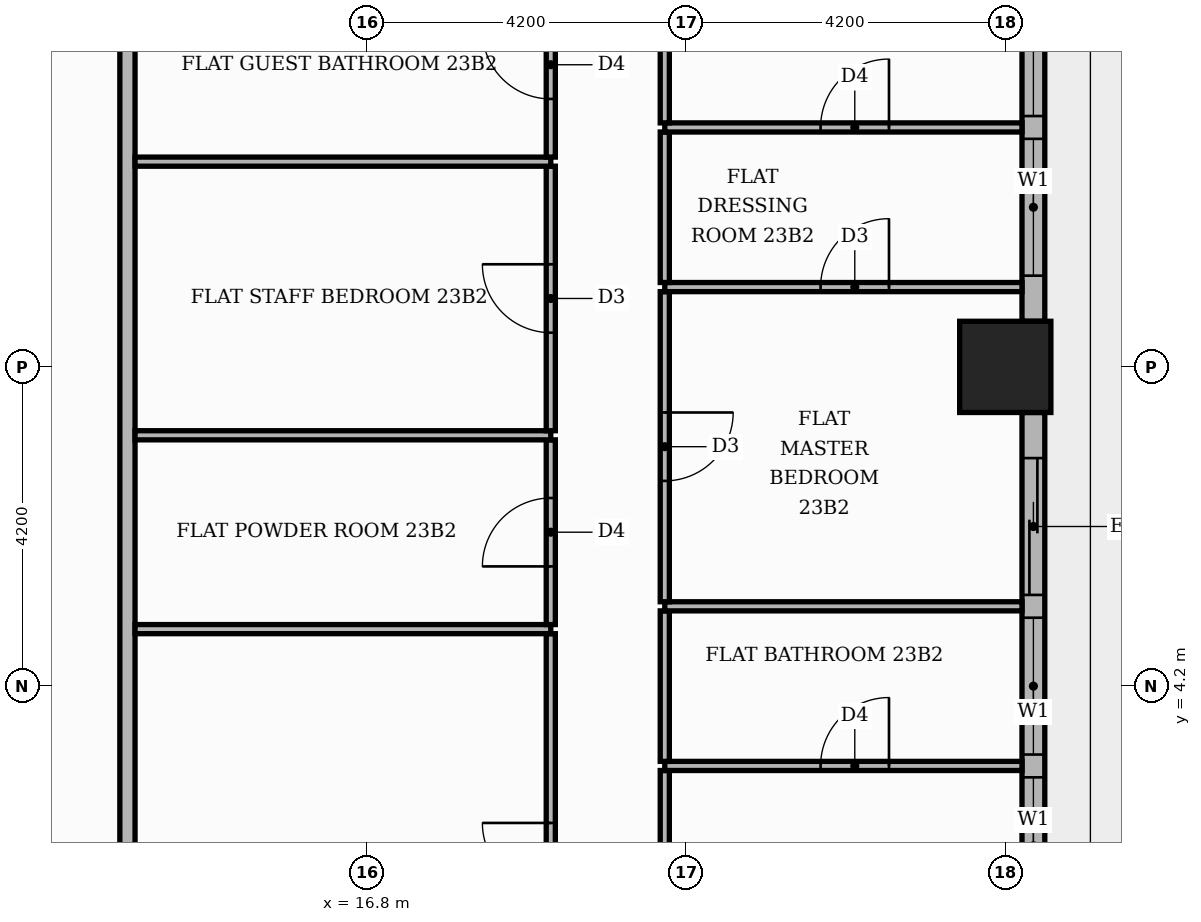
"""IFC4 building model, lengths in metres.
Left out: names, types, materials, properties, quantities, classifications, styles, units other than length and angle.
Written with IfcOpenShell. Run it as: python <this file> out.ifc"""

import sys

from ifc_helpers import new_model, si_unit, direction, frame, frame_2d, origin, origin_2d, place, context, subcontext, project, spatial, rectangle, extrude, element, fill, save


model = new_model("IFC4")
c1 = context("Model", 3, precision=1e-05, world=origin(), true_north=direction((0.0, 1.0)))
c2 = subcontext(c1, "Body", "Model", "MODEL_VIEW")
j1 = project(units=[si_unit("LENGTHUNIT", "METRE"), si_unit("PLANEANGLEUNIT", "RADIAN")], contexts=[c1])
p1 = place(None, origin())
s1 = spatial("IfcSite", under=j1, at=p1, CompositionType="ELEMENT")
p2 = place(p1, origin())
s2 = spatial("IfcBuilding", under=s1, at=p2, CompositionType="ELEMENT")
p3 = place(p2, frame((0.0, 0.0, 98.7)))
s3 = spatial("IfcBuildingStorey", under=s2, at=p3, CompositionType="ELEMENT", Elevation=98.7)
p4 = place(p3, frame((25.2, 8.4, 0.0), z_axis=(0.0, 0.0, 1.0), x_axis=(1.0, 0.0, 0.0)))
e1 = element("IfcColumn", 1, at=p4, inside=s3, PredefinedType="COLUMN", context=c2, shape_type="SweptSolid", body=[
    extrude(rectangle(XDim=1.2, YDim=1.2, at=origin_2d()), origin(), (0.0, 0.0, 1.0), 3.9),
])
p5 = place(p3, frame((25.57, 0.6, 0.0), z_axis=(0.0, 0.0, 1.0), x_axis=(0.0, 1.0, 0.0)))
e2 = element("IfcWall", 2, at=p5, inside=s3, PredefinedType="STANDARD", context=c2, shape_type="SweptSolid", body=[
    extrude(rectangle(XDim=7.2, YDim=0.3, at=frame_2d((3.6, 0.0))), origin(), (0.0, 0.0, 1.0), 3.48),
])
p6 = place(p5, frame((0.6, 0.0, 0.9)))
e3 = element("IfcOpeningElement", 3, at=p6, cuts=e2, PredefinedType="OPENING", context=c2, shape_type="SweptSolid", body=[
    extrude(rectangle(XDim=1.8, YDim=2.1, at=frame_2d((0.9, 1.05))), frame((0.0, 0.16, 0.0), z_axis=(0.0, -1.0, 0.0), x_axis=(1.0, 0.0, 0.0)), (0.0, 0.0, 1.0), 0.32),
])
p7 = place(p5, frame((2.7, 0.0, 0.9)))
e4 = element("IfcOpeningElement", 4, at=p7, cuts=e2, PredefinedType="OPENING", context=c2, shape_type="SweptSolid", body=[
    extrude(rectangle(XDim=1.8, YDim=2.1, at=frame_2d((0.9, 1.05))), frame((0.0, 0.16, 0.0), z_axis=(0.0, -1.0, 0.0), x_axis=(1.0, 0.0, 0.0)), (0.0, 0.0, 1.0), 0.32),
])
p8 = place(p5, frame((4.8, 0.0, 0.0)))
e5 = element("IfcOpeningElement", 5, at=p8, cuts=e2, PredefinedType="OPENING", context=c2, shape_type="SweptSolid", body=[
    extrude(rectangle(XDim=1.8, YDim=2.4, at=frame_2d((0.9, 1.2))), frame((0.0, 0.16, 0.0), z_axis=(0.0, -1.0, 0.0), x_axis=(1.0, 0.0, 0.0)), (0.0, 0.0, 1.0), 0.32),
])
p9 = place(p3, frame((25.57, 9.0, 0.0), z_axis=(0.0, 0.0, 1.0), x_axis=(0.0, 1.0, 0.0)))
e6 = element("IfcWall", 6, at=p9, inside=s3, PredefinedType="STANDARD", context=c2, shape_type="SweptSolid", body=[
    extrude(rectangle(XDim=7.2, YDim=0.3, at=frame_2d((3.6, 0.0))), origin(), (0.0, 0.0, 1.0), 3.48),
])
p10 = place(p9, frame((0.6, 0.0, 0.9)))
e7 = element("IfcOpeningElement", 7, at=p10, cuts=e6, PredefinedType="OPENING", context=c2, shape_type="SweptSolid", body=[
    extrude(rectangle(XDim=1.8, YDim=2.1, at=frame_2d((0.9, 1.05))), frame((0.0, 0.16, 0.0), z_axis=(0.0, -1.0, 0.0), x_axis=(1.0, 0.0, 0.0)), (0.0, 0.0, 1.0), 0.32),
])
p11 = place(p9, frame((2.7, 0.0, 0.9)))
e8 = element("IfcOpeningElement", 8, at=p11, cuts=e6, PredefinedType="OPENING", context=c2, shape_type="SweptSolid", body=[
    extrude(rectangle(XDim=1.8, YDim=2.1, at=frame_2d((0.9, 1.05))), frame((0.0, 0.16, 0.0), z_axis=(0.0, -1.0, 0.0), x_axis=(1.0, 0.0, 0.0)), (0.0, 0.0, 1.0), 0.32),
])
p12 = place(p9, frame((4.8, 0.0, 0.9)))
e9 = element("IfcOpeningElement", 9, at=p12, cuts=e6, PredefinedType="OPENING", context=c2, shape_type="SweptSolid", body=[
    extrude(rectangle(XDim=1.8, YDim=2.1, at=frame_2d((0.9, 1.05))), frame((0.0, 0.16, 0.0), z_axis=(0.0, -1.0, 0.0), x_axis=(1.0, 0.0, 0.0)), (0.0, 0.0, 1.0), 0.32),
])
p13 = place(p3, frame((13.65, -5.15, 0.0), z_axis=(0.0, 0.0, 1.0), x_axis=(0.0, 1.0, 0.0)))
e10 = element("IfcWall", 10, at=p13, inside=s3, PredefinedType="PARTITIONING", context=c2, shape_type="SweptSolid", body=[
    extrude(rectangle(XDim=18.7, YDim=0.2, at=frame_2d((9.35, 0.0))), origin(), (0.0, 0.0, 1.0), 3.48),
])
p14 = place(p13, frame((1.45, 0.0, 0.0)))
e11 = element("IfcOpeningElement", 11, at=p14, cuts=e10, PredefinedType="OPENING", context=c2, shape_type="SweptSolid", body=[
    extrude(rectangle(XDim=1.1, YDim=2.4, at=frame_2d((0.55, 1.2))), frame((0.0, 0.11, 0.0), z_axis=(0.0, -1.0, 0.0), x_axis=(1.0, 0.0, 0.0)), (0.0, 0.0, 1.0), 0.22),
])
p15 = place(p3, frame((19.22, -0.99, 0.0), z_axis=(0.0, 0.0, 1.0), x_axis=(0.0, 1.0, 0.0)))
e12 = element("IfcWall", 12, at=p15, inside=s3, PredefinedType="PARTITIONING", context=c2, shape_type="SweptSolid", body=[
    extrude(rectangle(XDim=5.88, YDim=0.12, at=frame_2d((2.94, 0.0))), origin(), (0.0, 0.0, 1.0), 3.48),
])
p16 = place(p15, frame((2.49, 0.0, 0.0)))
e13 = element("IfcOpeningElement", 13, at=p16, cuts=e12, PredefinedType="OPENING", context=c2, shape_type="SweptSolid", body=[
    extrude(rectangle(XDim=0.9, YDim=2.1, at=frame_2d((0.45, 1.05))), frame((0.0, 0.07, 0.0), z_axis=(0.0, -1.0, 0.0), x_axis=(1.0, 0.0, 0.0)), (0.0, 0.0, 1.0), 0.14),
])
p17 = place(p3, frame((20.72, -0.99, 0.0), z_axis=(0.0, 0.0, 1.0), x_axis=(0.0, 1.0, 0.0)))
e14 = element("IfcWall", 14, at=p17, inside=s3, PredefinedType="PARTITIONING", context=c2, shape_type="SweptSolid", body=[
    extrude(rectangle(XDim=4.08, YDim=0.12, at=frame_2d((2.04, 0.0))), origin(), (0.0, 0.0, 1.0), 3.48),
])
p18 = place(p17, frame((1.59, 0.0, 0.0)))
e15 = element("IfcOpeningElement", 15, at=p18, cuts=e14, PredefinedType="OPENING", context=c2, shape_type="SweptSolid", body=[
    extrude(rectangle(XDim=0.9, YDim=2.1, at=frame_2d((0.45, 1.05))), frame((0.0, 0.07, 0.0), z_axis=(0.0, -1.0, 0.0), x_axis=(1.0, 0.0, 0.0)), (0.0, 0.0, 1.0), 0.14),
])
p19 = place(p3, frame((20.72, 3.15, 0.0), z_axis=(0.0, 0.0, 1.0), x_axis=(1.0, 0.0, 0.0)))
e16 = element("IfcWall", 16, at=p19, inside=s3, PredefinedType="PARTITIONING", context=c2, shape_type="SweptSolid", body=[
    extrude(rectangle(XDim=4.7, YDim=0.12, at=frame_2d((2.35, 0.0))), origin(), (0.0, 0.0, 1.0), 3.48),
])
p20 = place(p19, frame((2.05, 0.0, 0.0)))
e17 = element("IfcOpeningElement", 17, at=p20, cuts=e16, PredefinedType="OPENING", context=c2, shape_type="SweptSolid", body=[
    extrude(rectangle(XDim=0.9, YDim=2.1, at=frame_2d((0.45, 1.05))), frame((0.0, 0.07, 0.0), z_axis=(0.0, -1.0, 0.0), x_axis=(1.0, 0.0, 0.0)), (0.0, 0.0, 1.0), 0.14),
])
p21 = place(p3, frame((20.72, 3.21, 0.0), z_axis=(0.0, 0.0, 1.0), x_axis=(0.0, 1.0, 0.0)))
e18 = element("IfcWall", 18, at=p21, inside=s3, PredefinedType="PARTITIONING", context=c2, shape_type="SweptSolid", body=[
    extrude(rectangle(XDim=1.98, YDim=0.12, at=frame_2d((0.99, 0.0))), origin(), (0.0, 0.0, 1.0), 3.48),
])
p22 = place(p3, frame((13.75, 4.95, 0.0), z_axis=(0.0, 0.0, 1.0), x_axis=(1.0, 0.0, 0.0)))
e19 = element("IfcWall", 19, at=p22, inside=s3, PredefinedType="PARTITIONING", context=c2, shape_type="SweptSolid", body=[
    extrude(rectangle(XDim=5.47, YDim=0.12, at=frame_2d((2.735, 0.0))), origin(), (0.0, 0.0, 1.0), 3.48),
])
p23 = place(p3, frame((19.22, 5.01, 0.0), z_axis=(0.0, 0.0, 1.0), x_axis=(0.0, 1.0, 0.0)))
e20 = element("IfcWall", 20, at=p23, inside=s3, PredefinedType="PARTITIONING", context=c2, shape_type="SweptSolid", body=[
    extrude(rectangle(XDim=2.43, YDim=0.12, at=frame_2d((1.215, 0.0))), origin(), (0.0, 0.0, 1.0), 3.48),
])
p24 = place(p23, frame((0.765, 0.0, 0.0)))
e21 = element("IfcOpeningElement", 21, at=p24, cuts=e20, PredefinedType="OPENING", context=c2, shape_type="SweptSolid", body=[
    extrude(rectangle(XDim=0.9, YDim=2.1, at=frame_2d((0.45, 1.05))), frame((0.0, 0.07, 0.0), z_axis=(0.0, -1.0, 0.0), x_axis=(1.0, 0.0, 0.0)), (0.0, 0.0, 1.0), 0.14),
])
p25 = place(p3, frame((20.72, 5.25, 0.0), z_axis=(0.0, 0.0, 1.0), x_axis=(1.0, 0.0, 0.0)))
e22 = element("IfcWall", 22, at=p25, inside=s3, PredefinedType="PARTITIONING", context=c2, shape_type="SweptSolid", body=[
    extrude(rectangle(XDim=4.7, YDim=0.12, at=frame_2d((2.35, 0.0))), origin(), (0.0, 0.0, 1.0), 3.48),
])
p26 = place(p3, frame((20.72, 5.31, 0.0), z_axis=(0.0, 0.0, 1.0), x_axis=(0.0, 1.0, 0.0)))
e23 = element("IfcWall", 23, at=p26, inside=s3, PredefinedType="PARTITIONING", context=c2, shape_type="SweptSolid", body=[
    extrude(rectangle(XDim=4.08, YDim=0.12, at=frame_2d((2.04, 0.0))), origin(), (0.0, 0.0, 1.0), 3.48),
])
p27 = place(p26, frame((1.59, 0.0, 0.0)))
e24 = element("IfcOpeningElement", 24, at=p27, cuts=e23, PredefinedType="OPENING", context=c2, shape_type="SweptSolid", body=[
    extrude(rectangle(XDim=0.9, YDim=2.1, at=frame_2d((0.45, 1.05))), frame((0.0, 0.07, 0.0), z_axis=(0.0, -1.0, 0.0), x_axis=(1.0, 0.0, 0.0)), (0.0, 0.0, 1.0), 0.14),
])
p28 = place(p3, frame((13.75, 7.5, 0.0), z_axis=(0.0, 0.0, 1.0), x_axis=(1.0, 0.0, 0.0)))
e25 = element("IfcWall", 25, at=p28, inside=s3, PredefinedType="PARTITIONING", context=c2, shape_type="SweptSolid", body=[
    extrude(rectangle(XDim=5.47, YDim=0.12, at=frame_2d((2.735, 0.0))), origin(), (0.0, 0.0, 1.0), 3.48),
])
p29 = place(p3, frame((19.22, 7.56, 0.0), z_axis=(0.0, 0.0, 1.0), x_axis=(0.0, 1.0, 0.0)))
e26 = element("IfcWall", 26, at=p29, inside=s3, PredefinedType="PARTITIONING", context=c2, shape_type="SweptSolid", body=[
    extrude(rectangle(XDim=3.48, YDim=0.12, at=frame_2d((1.74, 0.0))), origin(), (0.0, 0.0, 1.0), 3.48),
])
p30 = place(p29, frame((1.29, 0.0, 0.0)))
e27 = element("IfcOpeningElement", 27, at=p30, cuts=e26, PredefinedType="OPENING", context=c2, shape_type="SweptSolid", body=[
    extrude(rectangle(XDim=0.9, YDim=2.1, at=frame_2d((0.45, 1.05))), frame((0.0, 0.07, 0.0), z_axis=(0.0, -1.0, 0.0), x_axis=(1.0, 0.0, 0.0)), (0.0, 0.0, 1.0), 0.14),
])
p31 = place(p3, frame((20.72, 9.45, 0.0), z_axis=(0.0, 0.0, 1.0), x_axis=(1.0, 0.0, 0.0)))
e28 = element("IfcWall", 28, at=p31, inside=s3, PredefinedType="PARTITIONING", context=c2, shape_type="SweptSolid", body=[
    extrude(rectangle(XDim=4.7, YDim=0.12, at=frame_2d((2.35, 0.0))), origin(), (0.0, 0.0, 1.0), 3.48),
])
p32 = place(p31, frame((2.05, 0.0, 0.0)))
e29 = element("IfcOpeningElement", 29, at=p32, cuts=e28, PredefinedType="OPENING", context=c2, shape_type="SweptSolid", body=[
    extrude(rectangle(XDim=0.9, YDim=2.1, at=frame_2d((0.45, 1.05))), frame((0.0, 0.07, 0.0), z_axis=(0.0, -1.0, 0.0), x_axis=(1.0, 0.0, 0.0)), (0.0, 0.0, 1.0), 0.14),
])
p33 = place(p3, frame((20.72, 9.51, 0.0), z_axis=(0.0, 0.0, 1.0), x_axis=(0.0, 1.0, 0.0)))
e30 = element("IfcWall", 30, at=p33, inside=s3, PredefinedType="PARTITIONING", context=c2, shape_type="SweptSolid", body=[
    extrude(rectangle(XDim=1.98, YDim=0.12, at=frame_2d((0.99, 0.0))), origin(), (0.0, 0.0, 1.0), 3.48),
])
p34 = place(p3, frame((13.75, 11.1, 0.0), z_axis=(0.0, 0.0, 1.0), x_axis=(1.0, 0.0, 0.0)))
e31 = element("IfcWall", 31, at=p34, inside=s3, PredefinedType="PARTITIONING", context=c2, shape_type="SweptSolid", body=[
    extrude(rectangle(XDim=5.47, YDim=0.12, at=frame_2d((2.735, 0.0))), origin(), (0.0, 0.0, 1.0), 3.48),
])
p35 = place(p3, frame((19.22, 11.16, 0.0), z_axis=(0.0, 0.0, 1.0), x_axis=(0.0, 1.0, 0.0)))
e32 = element("IfcWall", 32, at=p35, inside=s3, PredefinedType="PARTITIONING", context=c2, shape_type="SweptSolid", body=[
    extrude(rectangle(XDim=2.39, YDim=0.12, at=frame_2d((1.195, 0.0))), origin(), (0.0, 0.0, 1.0), 3.48),
])
p36 = place(p35, frame((0.765, 0.0, 0.0)))
e33 = element("IfcOpeningElement", 33, at=p36, cuts=e32, PredefinedType="OPENING", context=c2, shape_type="SweptSolid", body=[
    extrude(rectangle(XDim=0.9, YDim=2.1, at=frame_2d((0.45, 1.05))), frame((0.0, 0.07, 0.0), z_axis=(0.0, -1.0, 0.0), x_axis=(1.0, 0.0, 0.0)), (0.0, 0.0, 1.0), 0.14),
])
p37 = place(p3, frame((20.72, 11.55, 0.0), z_axis=(0.0, 0.0, 1.0), x_axis=(1.0, 0.0, 0.0)))
e34 = element("IfcWall", 34, at=p37, inside=s3, PredefinedType="PARTITIONING", context=c2, shape_type="SweptSolid", body=[
    extrude(rectangle(XDim=4.7, YDim=0.12, at=frame_2d((2.35, 0.0))), origin(), (0.0, 0.0, 1.0), 3.48),
])
p38 = place(p37, frame((2.05, 0.0, 0.0)))
e35 = element("IfcOpeningElement", 35, at=p38, cuts=e34, PredefinedType="OPENING", context=c2, shape_type="SweptSolid", body=[
    extrude(rectangle(XDim=0.9, YDim=2.1, at=frame_2d((0.45, 1.05))), frame((0.0, 0.07, 0.0), z_axis=(0.0, -1.0, 0.0), x_axis=(1.0, 0.0, 0.0)), (0.0, 0.0, 1.0), 0.14),
])
p39 = place(p3, frame((20.72, 11.61, 0.0), z_axis=(0.0, 0.0, 1.0), x_axis=(0.0, 1.0, 0.0)))
e36 = element("IfcWall", 36, at=p39, inside=s3, PredefinedType="PARTITIONING", context=c2, shape_type="SweptSolid", body=[
    extrude(rectangle(XDim=1.94, YDim=0.12, at=frame_2d((0.97, 0.0))), origin(), (0.0, 0.0, 1.0), 3.48),
])
p40 = place(p6, origin())
e37 = element("IfcWindow", 37, at=p40, inside=s3, PartitioningType="SINGLE_PANEL", PredefinedType="WINDOW", context=c2, shape_type="SweptSolid", body=[
    extrude(rectangle(XDim=1.8, YDim=2.1, at=frame_2d((0.9, 1.05))), frame((0.0, 0.03, 0.0), z_axis=(0.0, -1.0, 0.0), x_axis=(1.0, 0.0, 0.0)), (0.0, 0.0, 1.0), 0.06),
])
fill(e3, e37)
p41 = place(p7, origin())
e38 = element("IfcWindow", 38, at=p41, inside=s3, PartitioningType="SINGLE_PANEL", PredefinedType="WINDOW", context=c2, shape_type="SweptSolid", body=[
    extrude(rectangle(XDim=1.8, YDim=2.1, at=frame_2d((0.9, 1.05))), frame((0.0, 0.03, 0.0), z_axis=(0.0, -1.0, 0.0), x_axis=(1.0, 0.0, 0.0)), (0.0, 0.0, 1.0), 0.06),
])
fill(e4, e38)
p42 = place(p8, origin())
e39 = element("IfcDoor", 39, at=p42, inside=s3, OperationType="SLIDING_TO_RIGHT", PredefinedType="DOOR", context=c2, shape_type="SweptSolid", body=[
    extrude(rectangle(XDim=1.8, YDim=2.4, at=frame_2d((0.9, 1.2))), frame((0.0, 0.025, 0.0), z_axis=(0.0, -1.0, 0.0), x_axis=(1.0, 0.0, 0.0)), (0.0, 0.0, 1.0), 0.05),
])
fill(e5, e39)
p43 = place(p10, origin())
e40 = element("IfcWindow", 40, at=p43, inside=s3, PartitioningType="SINGLE_PANEL", PredefinedType="WINDOW", context=c2, shape_type="SweptSolid", body=[
    extrude(rectangle(XDim=1.8, YDim=2.1, at=frame_2d((0.9, 1.05))), frame((0.0, 0.03, 0.0), z_axis=(0.0, -1.0, 0.0), x_axis=(1.0, 0.0, 0.0)), (0.0, 0.0, 1.0), 0.06),
])
fill(e7, e40)
p44 = place(p11, origin())
e41 = element("IfcWindow", 41, at=p44, inside=s3, PartitioningType="SINGLE_PANEL", PredefinedType="WINDOW", context=c2, shape_type="SweptSolid", body=[
    extrude(rectangle(XDim=1.8, YDim=2.1, at=frame_2d((0.9, 1.05))), frame((0.0, 0.03, 0.0), z_axis=(0.0, -1.0, 0.0), x_axis=(1.0, 0.0, 0.0)), (0.0, 0.0, 1.0), 0.06),
])
fill(e8, e41)
p45 = place(p16, origin())
e42 = element("IfcDoor", 42, at=p45, inside=s3, OperationType="SINGLE_SWING_RIGHT", PredefinedType="DOOR", context=c2, shape_type="SweptSolid", body=[
    extrude(rectangle(XDim=0.9, YDim=2.1, at=frame_2d((0.45, 1.05))), frame((0.0, 0.025, 0.0), z_axis=(0.0, -1.0, 0.0), x_axis=(1.0, 0.0, 0.0)), (0.0, 0.0, 1.0), 0.05),
])
fill(e13, e42)
p46 = place(p24, origin())
e43 = element("IfcDoor", 43, at=p46, inside=s3, OperationType="SINGLE_SWING_LEFT", PredefinedType="DOOR", context=c2, shape_type="SweptSolid", body=[
    extrude(rectangle(XDim=0.9, YDim=2.1, at=frame_2d((0.45, 1.05))), frame((0.0, 0.025, 0.0), z_axis=(0.0, -1.0, 0.0), x_axis=(1.0, 0.0, 0.0)), (0.0, 0.0, 1.0), 0.05),
])
fill(e21, e43)
p47 = place(p30, origin())
e44 = element("IfcDoor", 44, at=p47, inside=s3, OperationType="SINGLE_SWING_RIGHT", PredefinedType="DOOR", context=c2, shape_type="SweptSolid", body=[
    extrude(rectangle(XDim=0.9, YDim=2.1, at=frame_2d((0.45, 1.05))), frame((0.0, 0.025, 0.0), z_axis=(0.0, -1.0, 0.0), x_axis=(1.0, 0.0, 0.0)), (0.0, 0.0, 1.0), 0.05),
])
fill(e27, e44)
p48 = place(p36, origin())
e45 = element("IfcDoor", 45, at=p48, inside=s3, OperationType="SINGLE_SWING_RIGHT", PredefinedType="DOOR", context=c2, shape_type="SweptSolid", body=[
    extrude(rectangle(XDim=0.9, YDim=2.1, at=frame_2d((0.45, 1.05))), frame((0.0, 0.025, 0.0), z_axis=(0.0, -1.0, 0.0), x_axis=(1.0, 0.0, 0.0)), (0.0, 0.0, 1.0), 0.05),
])
fill(e33, e45)
p49 = place(p20, origin())
e46 = element("IfcDoor", 46, at=p49, inside=s3, OperationType="SINGLE_SWING_RIGHT", PredefinedType="DOOR", context=c2, shape_type="SweptSolid", body=[
    extrude(rectangle(XDim=0.9, YDim=2.1, at=frame_2d((0.45, 1.05))), frame((0.0, 0.025, 0.0), z_axis=(0.0, -1.0, 0.0), x_axis=(1.0, 0.0, 0.0)), (0.0, 0.0, 1.0), 0.05),
])
fill(e17, e46)
p50 = place(p27, frame((0.9, 0.0, 0.0), z_axis=(0.0, 0.0, 1.0), x_axis=(-1.0, 0.0, 0.0)))
e47 = element("IfcDoor", 47, at=p50, inside=s3, OperationType="SINGLE_SWING_RIGHT", PredefinedType="DOOR", context=c2, shape_type="SweptSolid", body=[
    extrude(rectangle(XDim=0.9, YDim=2.1, at=frame_2d((0.45, 1.05))), frame((0.0, 0.025, 0.0), z_axis=(0.0, -1.0, 0.0), x_axis=(1.0, 0.0, 0.0)), (0.0, 0.0, 1.0), 0.05),
])
fill(e24, e47)
p51 = place(p32, origin())
e48 = element("IfcDoor", 48, at=p51, inside=s3, OperationType="SINGLE_SWING_RIGHT", PredefinedType="DOOR", context=c2, shape_type="SweptSolid", body=[
    extrude(rectangle(XDim=0.9, YDim=2.1, at=frame_2d((0.45, 1.05))), frame((0.0, 0.025, 0.0), z_axis=(0.0, -1.0, 0.0), x_axis=(1.0, 0.0, 0.0)), (0.0, 0.0, 1.0), 0.05),
])
fill(e29, e48)
p52 = place(p38, origin())
e49 = element("IfcDoor", 49, at=p52, inside=s3, OperationType="SINGLE_SWING_RIGHT", PredefinedType="DOOR", context=c2, shape_type="SweptSolid", body=[
    extrude(rectangle(XDim=0.9, YDim=2.1, at=frame_2d((0.45, 1.05))), frame((0.0, 0.025, 0.0), z_axis=(0.0, -1.0, 0.0), x_axis=(1.0, 0.0, 0.0)), (0.0, 0.0, 1.0), 0.05),
])
fill(e35, e49)
save(model, sys.argv[1])
